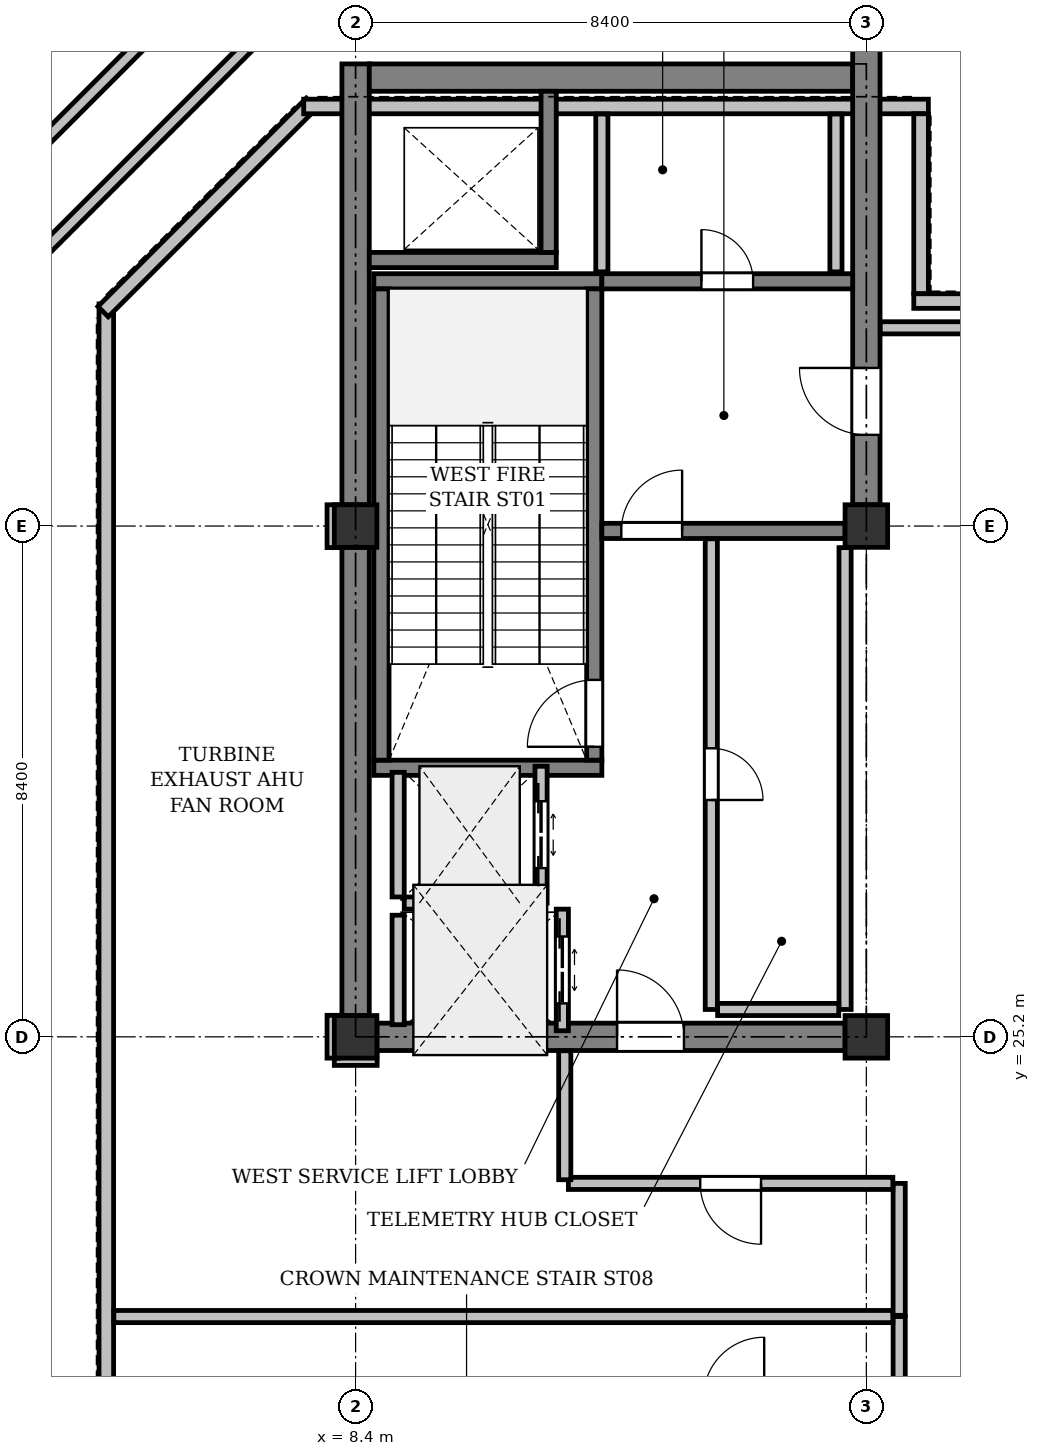
"""IFC4 building model, lengths in metres.
Left out: names, types, materials, properties, quantities, classifications, styles, units other than length and angle.
Written with IfcOpenShell. Run it as: python <this file> out.ifc"""

import sys

from ifc_helpers import new_model, si_unit, direction, frame, frame_2d, origin, origin_2d, place, context, subcontext, project, spatial, rectangle, extrude, element, fill, save


model = new_model("IFC4")
c1 = context("Model", 3, precision=1e-05, world=origin(), true_north=direction((0.0, 1.0)))
c2 = subcontext(c1, "Body", "Model", "MODEL_VIEW")
j1 = project(units=[si_unit("LENGTHUNIT", "METRE"), si_unit("PLANEANGLEUNIT", "RADIAN")], contexts=[c1])
p1 = place(None, origin())
s1 = spatial("IfcSite", under=j1, at=p1, CompositionType="ELEMENT")
p2 = place(p1, origin())
s2 = spatial("IfcBuilding", under=s1, at=p2, CompositionType="ELEMENT")
p3 = place(p2, frame((0.0, 0.0, 333.0)))
s3 = spatial("IfcBuildingStorey", under=s2, at=p3, CompositionType="ELEMENT", Elevation=333.0)
for number, where, z_axis, x_axis in (
    (1, (8.4, 25.2, 0.0), (0.0, 0.0, 1.0), (1.0, 0.0, 0.0)),
    (2, (8.4, 33.6, 0.0), (0.0, 0.0, 1.0), (1.0, 0.0, 0.0)),
    (3, (16.8, 25.2, 0.0), (0.0, 0.0, 1.0), (1.0, 0.0, 0.0)),
    (4, (16.8, 33.6, 0.0), (0.0, 0.0, 1.0), (1.0, 0.0, 0.0)),
):
    element("IfcColumn", number, at=place(p3, frame(where, z_axis=z_axis, x_axis=x_axis)), inside=s3, PredefinedType="COLUMN", context=c2, shape_type="SweptSolid", body=[
        extrude(rectangle(XDim=0.7, YDim=0.7, at=origin_2d()), origin(), (0.0, 0.0, 1.0), 5.05),
    ])
p4 = place(p3, frame((5.129, 41.788, 0.0), z_axis=(0.0, 0.0, 1.0), x_axis=(-0.707106781187, -0.707106781187, 0.0)))
e5 = element("IfcWall", 5, at=p4, inside=s3, PredefinedType="PARAPET", context=c2, shape_type="SweptSolid", body=[
    extrude(rectangle(XDim=7.154, YDim=0.2, at=frame_2d((3.577, 0.0))), origin(), (0.0, 0.0, 1.0), 1.15),
])
p5 = place(p3, frame((3.012, 37.871, 0.0), z_axis=(0.0, 0.0, 1.0), x_axis=(0.707106781187, 0.707106781187, 0.0)))
e6 = element("IfcWall", 6, at=p5, inside=s3, PredefinedType="PARAPET", context=c2, shape_type="SweptSolid", body=[
    extrude(rectangle(XDim=5.74, YDim=0.2, at=frame_2d((2.87, 0.0))), origin(), (0.0, 0.0, 1.0), 1.15),
])
p6 = place(p3, frame((4.3, 7.62, 0.0), z_axis=(0.0, 0.0, 1.0), x_axis=(0.0, 1.0, 0.0)))
e7 = element("IfcWall", 7, at=p6, inside=s3, PredefinedType="STANDARD", context=c2, shape_type="SweptSolid", body=[
    extrude(rectangle(XDim=29.633, YDim=0.24, at=frame_2d((14.817, 0.0))), origin(), (0.0, 0.0, 1.0), 5.05),
])
p7 = place(p3, frame((4.247, 37.126, 0.0), z_axis=(0.0, 0.0, 1.0), x_axis=(0.707106781187, 0.707106781187, 0.0)))
e8 = element("IfcWall", 8, at=p7, inside=s3, PredefinedType="STANDARD", context=c2, shape_type="SweptSolid", body=[
    extrude(rectangle(XDim=4.846, YDim=0.24, at=frame_2d((2.423, 0.0))), origin(), (0.0, 0.0, 1.0), 5.05),
])
p8 = place(p3, frame((7.547, 40.5, 0.0), z_axis=(0.0, 0.0, 1.0), x_axis=(1.0, 0.0, 0.0)))
e9 = element("IfcWall", 9, at=p8, inside=s3, PredefinedType="STANDARD", context=c2, shape_type="SweptSolid", body=[
    extrude(rectangle(XDim=10.273, YDim=0.24, at=frame_2d((5.137, 0.0))), origin(), (0.0, 0.0, 1.0), 4.743),
])
p9 = place(p3, frame((17.7, 40.38, 0.0), z_axis=(0.0, 0.0, 1.0), x_axis=(0.0, -1.0, 0.0)))
e10 = element("IfcWall", 10, at=p9, inside=s3, PredefinedType="STANDARD", context=c2, shape_type="SweptSolid", body=[
    extrude(rectangle(XDim=2.96, YDim=0.24, at=frame_2d((1.48, 0.0))), origin(), (0.0, 0.0, 1.0), 5.05),
])
p10 = place(p3, frame((17.58, 37.3, 0.0), z_axis=(0.0, 0.0, 1.0), x_axis=(1.0, 0.0, 0.0)))
e11 = element("IfcWall", 11, at=p10, inside=s3, PredefinedType="STANDARD", context=c2, shape_type="SweptSolid", body=[
    extrude(rectangle(XDim=3.44, YDim=0.24, at=frame_2d((1.72, 0.0))), origin(), (0.0, 0.0, 1.0), 5.05),
])
p11 = place(p3, frame((8.4, 25.55, 0.0), z_axis=(0.0, 0.0, 1.0), x_axis=(0.0, 1.0, 0.0)))
e12 = element("IfcWall", 12, at=p11, inside=s3, PredefinedType="SHEAR", context=c2, shape_type="SweptSolid", body=[
    extrude(rectangle(XDim=7.7, YDim=0.45, at=frame_2d((3.85, 0.0))), origin(), (0.0, 0.0, 1.0), 5.05),
])
p12 = place(p3, frame((8.4, 33.95, 0.0), z_axis=(0.0, 0.0, 1.0), x_axis=(0.0, 1.0, 0.0)))
e13 = element("IfcWall", 13, at=p12, inside=s3, PredefinedType="SHEAR", context=c2, shape_type="SweptSolid", body=[
    extrude(rectangle(XDim=7.25, YDim=0.45, at=frame_2d((3.625, 0.0))), origin(), (0.0, 0.0, 1.0), 5.05),
])
p13 = place(p3, frame((8.625, 40.975, 0.0), z_axis=(0.0, 0.0, 1.0), x_axis=(1.0, 0.0, 0.0)))
e14 = element("IfcWall", 14, at=p13, inside=s3, PredefinedType="SHEAR", context=c2, shape_type="SweptSolid", body=[
    extrude(rectangle(XDim=7.95, YDim=0.45, at=frame_2d((3.975, 0.0))), origin(), (0.0, 0.0, 1.0), 5.05),
])
p14 = place(p3, frame((16.8, 33.95, 0.0), z_axis=(0.0, 0.0, 1.0), x_axis=(0.0, 1.0, 0.0)))
e15 = element("IfcWall", 15, at=p14, inside=s3, PredefinedType="SHEAR", context=c2, shape_type="SweptSolid", body=[
    extrude(rectangle(XDim=7.7, YDim=0.45, at=frame_2d((3.85, 0.0))), origin(), (0.0, 0.0, 1.0), 5.05),
])
p15 = place(p14, frame((1.15, 0.0, 0.0)))
e16 = element("IfcOpeningElement", 16, at=p15, cuts=e15, PredefinedType="OPENING", context=c2, shape_type="SweptSolid", body=[
    extrude(rectangle(XDim=1.1, YDim=2.15, at=frame_2d((0.55, 1.075))), frame((0.0, 0.235, 0.0), z_axis=(0.0, -1.0, 0.0), x_axis=(1.0, 0.0, 0.0)), (0.0, 0.0, 1.0), 0.47),
])
p16 = place(p3, frame((8.75, 25.2, 0.0), z_axis=(0.0, 0.0, 1.0), x_axis=(1.0, 0.0, 0.0)))
e17 = element("IfcWall", 17, at=p16, inside=s3, PredefinedType="SHEAR", context=c2, shape_type="SweptSolid", body=[
    extrude(rectangle(XDim=7.7, YDim=0.45, at=frame_2d((3.85, 0.0))), origin(), (0.0, 0.0, 1.0), 5.05),
])
p17 = place(p16, frame((3.95, 0.0, 0.0)))
e18 = element("IfcOpeningElement", 18, at=p17, cuts=e17, PredefinedType="OPENING", context=c2, shape_type="SweptSolid", body=[
    extrude(rectangle(XDim=1.1, YDim=2.15, at=frame_2d((0.55, 1.075))), frame((0.0, 0.235, 0.0), z_axis=(0.0, -1.0, 0.0), x_axis=(1.0, 0.0, 0.0)), (0.0, 0.0, 1.0), 0.47),
])
for number, where, z_axis, x_axis in (
    (19, (12.45, 29.625, 0.0), (0.0, 0.0, 1.0), (-1.0, 0.0, 0.0)),
    (20, (12.45, 37.625, 0.0), (0.0, 0.0, 1.0), (-1.0, 0.0, 0.0)),
):
    element("IfcWall", number, at=place(p3, frame(where, z_axis=z_axis, x_axis=x_axis)), inside=s3, PredefinedType="SHEAR", context=c2, shape_type="SweptSolid", body=[
        extrude(rectangle(XDim=3.75, YDim=0.25, at=frame_2d((1.875, 0.0))), origin(), (0.0, 0.0, 1.0), 5.05),
    ])
p18 = place(p3, frame((12.325, 29.75, 0.0), z_axis=(0.0, 0.0, 1.0), x_axis=(0.0, 1.0, 0.0)))
e21 = element("IfcWall", 21, at=p18, inside=s3, PredefinedType="SHEAR", context=c2, shape_type="SweptSolid", body=[
    extrude(rectangle(XDim=7.75, YDim=0.25, at=frame_2d((3.875, 0.0))), origin(), (0.0, 0.0, 1.0), 5.05),
])
p19 = place(p18, frame((0.22, 0.0, 0.0)))
e22 = element("IfcOpeningElement", 22, at=p19, cuts=e21, PredefinedType="OPENING", context=c2, shape_type="SweptSolid", body=[
    extrude(rectangle(XDim=1.1, YDim=2.15, at=frame_2d((0.55, 1.075))), frame((0.0, 0.135, 0.0), z_axis=(0.0, -1.0, 0.0), x_axis=(1.0, 0.0, 0.0)), (0.0, 0.0, 1.0), 0.27),
])
p20 = place(p3, frame((8.825, 29.75, 0.0), z_axis=(0.0, 0.0, 1.0), x_axis=(0.0, 1.0, 0.0)))
e23 = element("IfcWall", 23, at=p20, inside=s3, PredefinedType="SHEAR", context=c2, shape_type="SweptSolid", body=[
    extrude(rectangle(XDim=7.75, YDim=0.25, at=frame_2d((3.875, 0.0))), origin(), (0.0, 0.0, 1.0), 5.05),
])
p21 = place(p3, frame((8.625, 37.975, 0.0), z_axis=(0.0, 0.0, 1.0), x_axis=(1.0, 0.0, 0.0)))
e24 = element("IfcWall", 24, at=p21, inside=s3, PredefinedType="SHEAR", context=c2, shape_type="SweptSolid", body=[
    extrude(rectangle(XDim=3.075, YDim=0.25, at=frame_2d((1.538, 0.0))), origin(), (0.0, 0.0, 1.0), 5.05),
])
p22 = place(p3, frame((11.575, 38.1, 0.0), z_axis=(0.0, 0.0, 1.0), x_axis=(0.0, 1.0, 0.0)))
e25 = element("IfcWall", 25, at=p22, inside=s3, PredefinedType="SHEAR", context=c2, shape_type="SweptSolid", body=[
    extrude(rectangle(XDim=2.65, YDim=0.25, at=frame_2d((1.325, 0.0))), origin(), (0.0, 0.0, 1.0), 5.05),
])
p23 = place(p3, frame((12.45, 33.52, 0.0), z_axis=(0.0, 0.0, 1.0), x_axis=(1.0, 0.0, 0.0)))
e26 = element("IfcWall", 26, at=p23, inside=s3, PredefinedType="SHEAR", context=c2, shape_type="SweptSolid", body=[
    extrude(rectangle(XDim=4.0, YDim=0.25, at=frame_2d((2.0, 0.0))), origin(), (0.0, 0.0, 1.0), 5.05),
])
p24 = place(p23, frame((0.32, 0.0, 0.0)))
e27 = element("IfcOpeningElement", 27, at=p24, cuts=e26, PredefinedType="OPENING", context=c2, shape_type="SweptSolid", body=[
    extrude(rectangle(XDim=1.0, YDim=2.15, at=frame_2d((0.5, 1.075))), frame((0.0, 0.135, 0.0), z_axis=(0.0, -1.0, 0.0), x_axis=(1.0, 0.0, 0.0)), (0.0, 0.0, 1.0), 0.27),
])
p25 = place(p3, frame((12.45, 37.625, 0.0), z_axis=(0.0, 0.0, 1.0), x_axis=(1.0, 0.0, 0.0)))
e28 = element("IfcWall", 28, at=p25, inside=s3, PredefinedType="SHEAR", context=c2, shape_type="SweptSolid", body=[
    extrude(rectangle(XDim=4.125, YDim=0.25, at=frame_2d((2.062, 0.0))), origin(), (0.0, 0.0, 1.0), 5.05),
])
p26 = place(p25, frame((1.637, 0.0, 0.0)))
e29 = element("IfcOpeningElement", 29, at=p26, cuts=e28, PredefinedType="OPENING", context=c2, shape_type="SweptSolid", body=[
    extrude(rectangle(XDim=0.85, YDim=2.15, at=frame_2d((0.425, 1.075))), frame((0.0, 0.135, 0.0), z_axis=(0.0, -1.0, 0.0), x_axis=(1.0, 0.0, 0.0)), (0.0, 0.0, 1.0), 0.27),
])
p27 = place(p3, frame((11.45, 27.4, 0.0), z_axis=(0.0, 0.0, 1.0), x_axis=(0.0, 1.0, 0.0)))
e30 = element("IfcWall", 30, at=p27, inside=s3, PredefinedType="PARTITIONING", context=c2, shape_type="SweptSolid", body=[
    extrude(rectangle(XDim=2.25, YDim=0.2, at=frame_2d((1.125, 0.0))), origin(), (0.0, 0.0, 1.0), 5.05),
])
p28 = place(p27, frame((0.575, 0.0, 0.0)))
e31 = element("IfcOpeningElement", 31, at=p28, cuts=e30, PredefinedType="OPENING", context=c2, shape_type="SweptSolid", body=[
    extrude(rectangle(XDim=1.1, YDim=2.2, at=frame_2d((0.55, 1.1))), frame((0.0, 0.11, 0.0), z_axis=(0.0, -1.0, 0.0), x_axis=(1.0, 0.0, 0.0)), (0.0, 0.0, 1.0), 0.22),
])
p29 = place(p3, frame((9.1, 27.5, 0.0), z_axis=(0.0, 0.0, 1.0), x_axis=(0.0, 1.0, 0.0)))
e32 = element("IfcWall", 32, at=p29, inside=s3, PredefinedType="PARTITIONING", context=c2, shape_type="SweptSolid", body=[
    extrude(rectangle(XDim=2.05, YDim=0.2, at=frame_2d((1.025, 0.0))), origin(), (0.0, 0.0, 1.0), 5.05),
])
p30 = place(p3, frame((9.2, 27.4, 0.0), z_axis=(0.0, 0.0, 1.0), x_axis=(1.0, 0.0, 0.0)))
e33 = element("IfcWall", 33, at=p30, inside=s3, PredefinedType="PARTITIONING", context=c2, shape_type="SweptSolid", body=[
    extrude(rectangle(XDim=2.15, YDim=0.2, at=frame_2d((1.075, 0.0))), origin(), (0.0, 0.0, 1.0), 5.05),
])
p31 = place(p3, frame((11.8, 25.3, 0.0), z_axis=(0.0, 0.0, 1.0), x_axis=(0.0, 1.0, 0.0)))
e34 = element("IfcWall", 34, at=p31, inside=s3, PredefinedType="PARTITIONING", context=c2, shape_type="SweptSolid", body=[
    extrude(rectangle(XDim=2.0, YDim=0.2, at=frame_2d((1.0, 0.0))), origin(), (0.0, 0.0, 1.0), 5.05),
])
p32 = place(p31, frame((0.45, 0.0, 0.0)))
e35 = element("IfcOpeningElement", 35, at=p32, cuts=e34, PredefinedType="OPENING", context=c2, shape_type="SweptSolid", body=[
    extrude(rectangle(XDim=1.1, YDim=2.2, at=frame_2d((0.55, 1.1))), frame((0.0, 0.11, 0.0), z_axis=(0.0, -1.0, 0.0), x_axis=(1.0, 0.0, 0.0)), (0.0, 0.0, 1.0), 0.22),
])
p33 = place(p3, frame((9.1, 25.4, 0.0), z_axis=(0.0, 0.0, 1.0), x_axis=(0.0, 1.0, 0.0)))
e36 = element("IfcWall", 36, at=p33, inside=s3, PredefinedType="PARTITIONING", context=c2, shape_type="SweptSolid", body=[
    extrude(rectangle(XDim=1.8, YDim=0.2, at=frame_2d((0.9, 0.0))), origin(), (0.0, 0.0, 1.0), 5.05),
])
p34 = place(p3, frame((16.45, 25.65, 0.0), z_axis=(0.0, 0.0, 1.0), x_axis=(0.0, 1.0, 0.0)))
e37 = element("IfcWall", 37, at=p34, inside=s3, PredefinedType="PARTITIONING", context=c2, shape_type="SweptSolid", body=[
    extrude(rectangle(XDim=7.595, YDim=0.2, at=frame_2d((3.798, 0.0))), origin(), (0.0, 0.0, 1.0), 5.05),
])
p35 = place(p3, frame((14.25, 33.39, 0.0), z_axis=(0.0, 0.0, 1.0), x_axis=(0.0, -1.0, 0.0)))
e38 = element("IfcWall", 38, at=p35, inside=s3, PredefinedType="PARTITIONING", context=c2, shape_type="SweptSolid", body=[
    extrude(rectangle(XDim=7.74, YDim=0.2, at=frame_2d((3.87, 0.0))), origin(), (0.0, 0.0, 1.0), 5.05),
])
p36 = place(p35, frame((3.445, 0.0, 0.0)))
e39 = element("IfcOpeningElement", 39, at=p36, cuts=e38, PredefinedType="OPENING", context=c2, shape_type="SweptSolid", body=[
    extrude(rectangle(XDim=0.85, YDim=2.15, at=frame_2d((0.425, 1.075))), frame((0.0, 0.11, 0.0), z_axis=(0.0, -1.0, 0.0), x_axis=(1.0, 0.0, 0.0)), (0.0, 0.0, 1.0), 0.22),
])
p37 = place(p3, frame((14.354, 25.65, 0.0), z_axis=(0.0, 0.0, 1.0), x_axis=(1.0, 0.0, 0.0)))
e40 = element("IfcWall", 40, at=p37, inside=s3, PredefinedType="PARTITIONING", context=c2, shape_type="SweptSolid", body=[
    extrude(rectangle(XDim=1.992, YDim=0.2, at=frame_2d((0.996, 0.0))), origin(), (0.0, 0.0, 1.0), 5.05),
])
for number, where, z_axis, x_axis in (
    (41, (16.3, 37.78, 0.0), (0.0, 0.0, 1.0), (0.0, 1.0, 0.0)),
    (42, (12.45, 40.376, 0.0), (0.0, 0.0, 1.0), (0.0, -1.0, 0.0)),
):
    element("IfcWall", number, at=place(p3, frame(where, z_axis=z_axis, x_axis=x_axis)), inside=s3, PredefinedType="PARTITIONING", context=c2, shape_type="SweptSolid", body=[
        extrude(rectangle(XDim=2.596, YDim=0.2, at=frame_2d((1.298, 0.0))), origin(), (0.0, 0.0, 1.0), 5.05),
    ])
p38 = place(p3, frame((17.34, 19.364, 0.0), z_axis=(0.0, 0.0, 1.0), x_axis=(0.0, 1.0, 0.0)))
e43 = element("IfcWall", 43, at=p38, inside=s3, PredefinedType="PARTITIONING", context=c2, shape_type="SweptSolid", body=[
    extrude(rectangle(XDim=1.236, YDim=0.2, at=frame_2d((0.618, 0.0))), origin(), (0.0, 0.0, 1.0), 5.05),
])
p39 = place(p3, frame((17.236, 20.6, 0.0), z_axis=(0.0, 0.0, 1.0), x_axis=(-1.0, 0.0, 0.0)))
e44 = element("IfcWall", 44, at=p39, inside=s3, PredefinedType="PARTITIONING", context=c2, shape_type="SweptSolid", body=[
    extrude(rectangle(XDim=12.812, YDim=0.2, at=frame_2d((6.406, 0.0))), origin(), (0.0, 0.0, 1.0), 4.743),
])
p40 = place(p3, frame((17.34, 20.62, 0.0), z_axis=(0.0, 0.0, 1.0), x_axis=(0.0, 1.0, 0.0)))
e45 = element("IfcWall", 45, at=p40, inside=s3, PredefinedType="PARTITIONING", context=c2, shape_type="SweptSolid", body=[
    extrude(rectangle(XDim=2.17, YDim=0.2, at=frame_2d((1.085, 0.0))), origin(), (0.0, 0.0, 1.0), 5.05),
])
p41 = place(p3, frame((17.236, 22.79, 0.0), z_axis=(0.0, 0.0, 1.0), x_axis=(-1.0, 0.0, 0.0)))
e46 = element("IfcWall", 46, at=p41, inside=s3, PredefinedType="PARTITIONING", context=c2, shape_type="SweptSolid", body=[
    extrude(rectangle(XDim=5.336, YDim=0.2, at=frame_2d((2.668, 0.0))), origin(), (0.0, 0.0, 1.0), 4.743),
])
p42 = place(p41, frame((2.168, 0.0, 0.0)))
e47 = element("IfcOpeningElement", 47, at=p42, cuts=e46, PredefinedType="OPENING", context=c2, shape_type="SweptSolid", body=[
    extrude(rectangle(XDim=1.0, YDim=2.15, at=frame_2d((0.5, 1.075))), frame((0.0, 0.11, 0.0), z_axis=(0.0, -1.0, 0.0), x_axis=(1.0, 0.0, 0.0)), (0.0, 0.0, 1.0), 0.22),
])
p43 = place(p3, frame((11.84, 22.85, 0.0), z_axis=(0.0, 0.0, 1.0), x_axis=(0.0, 1.0, 0.0)))
e48 = element("IfcWall", 48, at=p43, inside=s3, PredefinedType="PARTITIONING", context=c2, shape_type="SweptSolid", body=[
    extrude(rectangle(XDim=2.121, YDim=0.2, at=frame_2d((1.061, 0.0))), origin(), (0.0, 0.0, 1.0), 5.05),
])
p44 = place(p3, frame((8.754, 24.83, 0.0), z_axis=(0.0, 0.0, 1.0), x_axis=(-0.999999939844, -0.000346860888, 0.0)))
e49 = element("IfcWall", 49, at=p44, inside=s3, PredefinedType="PARTITIONING", context=c2, shape_type="SweptSolid", body=[
    extrude(rectangle(XDim=0.704, YDim=0.2, at=frame_2d((0.352, 0.0))), origin(), (0.0, 0.0, 1.0), 4.743),
])
for number, where, z_axis, x_axis in (
    (50, (8.03, 24.85, 0.0), (0.0, 0.0, 1.0), (0.001, 1.0, 0.0)),
    (51, (8.031, 33.246, 0.0), (0.0, 0.0, 1.0), (-0.001, 1.0, 0.0)),
):
    element("IfcWall", number, at=place(p3, frame(where, z_axis=z_axis, x_axis=x_axis)), inside=s3, PredefinedType="PARTITIONING", context=c2, shape_type="SweptSolid", body=[
        extrude(rectangle(XDim=0.704, YDim=0.2, at=frame_2d((0.352, 0.0))), origin(), (0.0, 0.0, 1.0), 5.05),
    ])
p45 = place(p3, frame((17.029, 36.86, 0.0), z_axis=(0.0, 0.0, 1.0), x_axis=(1.0, 0.0, 0.0)))
e52 = element("IfcWall", 52, at=p45, inside=s3, PredefinedType="PARTITIONING", context=c2, shape_type="SweptSolid", body=[
    extrude(rectangle(XDim=2.627, YDim=0.2, at=frame_2d((1.313, 0.0))), origin(), (0.0, 0.0, 1.0), 5.05),
])
p46 = place(p15, origin())
e53 = element("IfcDoor", 53, at=p46, inside=s3, OperationType="SINGLE_SWING_RIGHT", PredefinedType="DOOR", context=c2, shape_type="SweptSolid", body=[
    extrude(rectangle(XDim=1.1, YDim=2.15, at=frame_2d((0.55, 1.075))), frame((0.0, 0.025, 0.0), z_axis=(0.0, -1.0, 0.0), x_axis=(1.0, 0.0, 0.0)), (0.0, 0.0, 1.0), 0.05),
])
fill(e16, e53)
p47 = place(p17, origin())
e54 = element("IfcDoor", 54, at=p47, inside=s3, OperationType="SINGLE_SWING_LEFT", PredefinedType="DOOR", context=c2, shape_type="SweptSolid", body=[
    extrude(rectangle(XDim=1.1, YDim=2.15, at=frame_2d((0.55, 1.075))), frame((0.0, 0.025, 0.0), z_axis=(0.0, -1.0, 0.0), x_axis=(1.0, 0.0, 0.0)), (0.0, 0.0, 1.0), 0.05),
])
fill(e18, e54)
p48 = place(p19, origin())
e55 = element("IfcDoor", 55, at=p48, inside=s3, OperationType="SINGLE_SWING_LEFT", PredefinedType="DOOR", context=c2, shape_type="SweptSolid", body=[
    extrude(rectangle(XDim=1.1, YDim=2.15, at=frame_2d((0.55, 1.075))), frame((0.0, 0.025, 0.0), z_axis=(0.0, -1.0, 0.0), x_axis=(1.0, 0.0, 0.0)), (0.0, 0.0, 1.0), 0.05),
])
fill(e22, e55)
p49 = place(p24, origin())
e56 = element("IfcDoor", 56, at=p49, inside=s3, OperationType="SINGLE_SWING_RIGHT", PredefinedType="DOOR", context=c2, shape_type="SweptSolid", body=[
    extrude(rectangle(XDim=1.0, YDim=2.15, at=frame_2d((0.5, 1.075))), frame((0.0, 0.025, 0.0), z_axis=(0.0, -1.0, 0.0), x_axis=(1.0, 0.0, 0.0)), (0.0, 0.0, 1.0), 0.05),
])
fill(e27, e56)
p50 = place(p28, origin())
e57 = element("IfcDoor", 57, at=p50, inside=s3, OperationType="DOUBLE_DOOR_SLIDING", PredefinedType="DOOR", context=c2, shape_type="SweptSolid", body=[
    extrude(rectangle(XDim=1.1, YDim=2.2, at=frame_2d((0.55, 1.1))), frame((0.0, 0.025, 0.0), z_axis=(0.0, -1.0, 0.0), x_axis=(1.0, 0.0, 0.0)), (0.0, 0.0, 1.0), 0.05),
])
fill(e31, e57)
p51 = place(p32, origin())
e58 = element("IfcDoor", 58, at=p51, inside=s3, OperationType="DOUBLE_DOOR_SLIDING", PredefinedType="DOOR", context=c2, shape_type="SweptSolid", body=[
    extrude(rectangle(XDim=1.1, YDim=2.2, at=frame_2d((0.55, 1.1))), frame((0.0, 0.025, 0.0), z_axis=(0.0, -1.0, 0.0), x_axis=(1.0, 0.0, 0.0)), (0.0, 0.0, 1.0), 0.05),
])
fill(e35, e58)
p52 = place(p36, origin())
e59 = element("IfcDoor", 59, at=p52, inside=s3, OperationType="SINGLE_SWING_RIGHT", PredefinedType="DOOR", context=c2, shape_type="SweptSolid", body=[
    extrude(rectangle(XDim=0.85, YDim=2.15, at=frame_2d((0.425, 1.075))), frame((0.0, 0.025, 0.0), z_axis=(0.0, -1.0, 0.0), x_axis=(1.0, 0.0, 0.0)), (0.0, 0.0, 1.0), 0.05),
])
fill(e39, e59)
p53 = place(p26, origin())
e60 = element("IfcDoor", 60, at=p53, inside=s3, OperationType="SINGLE_SWING_LEFT", PredefinedType="DOOR", context=c2, shape_type="SweptSolid", body=[
    extrude(rectangle(XDim=0.85, YDim=2.15, at=frame_2d((0.425, 1.075))), frame((0.0, 0.025, 0.0), z_axis=(0.0, -1.0, 0.0), x_axis=(1.0, 0.0, 0.0)), (0.0, 0.0, 1.0), 0.05),
])
fill(e29, e60)
p54 = place(p42, origin())
e61 = element("IfcDoor", 61, at=p54, inside=s3, OperationType="SINGLE_SWING_LEFT", PredefinedType="DOOR", context=c2, shape_type="SweptSolid", body=[
    extrude(rectangle(XDim=1.0, YDim=2.15, at=frame_2d((0.5, 1.075))), frame((0.0, 0.025, 0.0), z_axis=(0.0, -1.0, 0.0), x_axis=(1.0, 0.0, 0.0)), (0.0, 0.0, 1.0), 0.05),
])
fill(e47, e61)
save(model, sys.argv[1])
